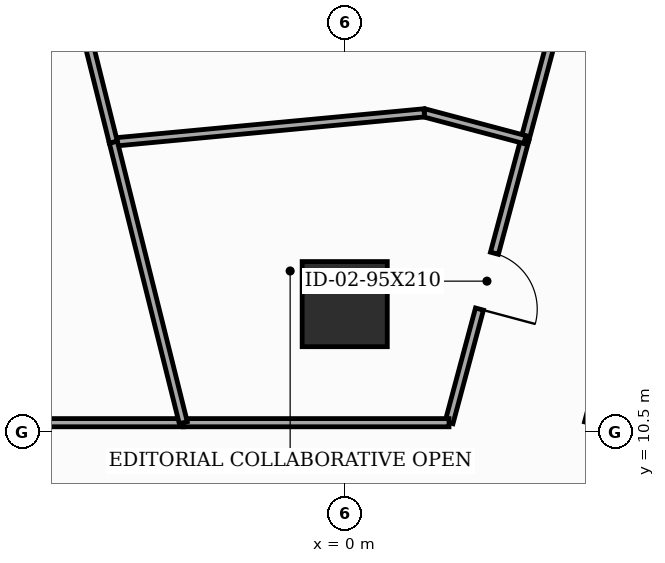
"""IFC4 building model, lengths in metres.
Left out: names, types, materials, properties, quantities, classifications, styles, units other than length and angle.
Written with IfcOpenShell. Run it as: python <this file> out.ifc"""

import sys

from ifc_helpers import new_model, si_unit, direction, frame, frame_2d, origin, origin_2d, place, context, subcontext, project, spatial, rectangle, extrude, element, fill, save


model = new_model("IFC4")
c1 = context("Model", 3, precision=1e-05, world=origin(), true_north=direction((0.0, 1.0)))
c2 = subcontext(c1, "Body", "Model", "MODEL_VIEW")
j1 = project(units=[si_unit("LENGTHUNIT", "METRE"), si_unit("PLANEANGLEUNIT", "RADIAN")], contexts=[c1])
p1 = place(None, origin())
s1 = spatial("IfcSite", under=j1, at=p1, CompositionType="ELEMENT")
p2 = place(p1, origin())
s2 = spatial("IfcBuilding", under=s1, at=p2, CompositionType="ELEMENT")
p3 = place(p2, frame((0.0, 0.0, 74.1)))
s3 = spatial("IfcBuildingStorey", under=s2, at=p3, CompositionType="ELEMENT", Elevation=74.1)
p4 = place(p3, frame((0.0, 12.6, 0.0), z_axis=(0.0, 0.0, 1.0), x_axis=(1.0, 0.0, 0.0)))
e1 = element("IfcColumn", 1, at=p4, inside=s3, PredefinedType="COLUMN", context=c2, shape_type="SweptSolid", body=[
    extrude(rectangle(XDim=1.4, YDim=1.4, at=origin_2d()), origin(), (0.0, 0.0, 1.0), 3.7),
])
p5 = place(p3, frame((2.963, 15.306, 0.0), z_axis=(0.0, 0.0, 1.0), x_axis=(-0.25886350996, -0.965913910869, 0.0)))
e2 = element("IfcWall", 2, at=p5, inside=s3, PredefinedType="PARTITIONING", context=c2, shape_type="SweptSolid", body=[
    extrude(rectangle(XDim=4.82, YDim=0.135, at=frame_2d((2.41, 0.0))), origin(), (0.0, 0.0, 1.0), 2.785),
])
p6 = place(p5, frame((1.935, 0.0, 0.0)))
e3 = element("IfcOpeningElement", 3, at=p6, cuts=e2, PredefinedType="OPENING", context=c2, shape_type="SweptSolid", body=[
    extrude(rectangle(XDim=0.95, YDim=2.1, at=frame_2d((0.475, 1.05))), frame((0.0, 0.077, 0.0), z_axis=(0.0, -1.0, 0.0), x_axis=(1.0, 0.0, 0.0)), (0.0, 0.0, 1.0), 0.155),
])
p7 = place(p3, frame((1.715, 10.65, 0.0), z_axis=(0.0, 0.0, 1.0), x_axis=(-1.0, 0.0, 0.0)))
e4 = element("IfcWall", 4, at=p7, inside=s3, PredefinedType="PARTITIONING", context=c2, shape_type="SweptSolid", body=[
    extrude(rectangle(XDim=4.37, YDim=0.135, at=frame_2d((2.185, 0.0))), origin(), (0.0, 0.0, 1.0), 2.785),
])
p8 = place(p3, frame((4.269, 20.183, 0.0), z_axis=(0.0, 0.0, 1.0), x_axis=(-0.258691774004, -0.965959919491, 0.0)))
e5 = element("IfcWall", 5, at=p8, inside=s3, PredefinedType="PARTITIONING", context=c2, shape_type="SweptSolid", body=[
    extrude(rectangle(XDim=5.049, YDim=0.135, at=frame_2d((2.524, 0.0))), origin(), (0.0, 0.0, 1.0), 3.085),
])
p9 = place(p8, frame((2.049, 0.0, 0.0)))
e6 = element("IfcOpeningElement", 6, at=p9, cuts=e5, PredefinedType="OPENING", context=c2, shape_type="SweptSolid", body=[
    extrude(rectangle(XDim=0.95, YDim=2.1, at=frame_2d((0.475, 1.05))), frame((0.0, 0.077, 0.0), z_axis=(0.0, -1.0, 0.0), x_axis=(1.0, 0.0, 0.0)), (0.0, 0.0, 1.0), 0.155),
])
p10 = place(p3, frame((3.992, 10.65, 0.0), z_axis=(0.0, 0.0, 1.0), x_axis=(0.258975157658, 0.965883982534, 0.0)))
e7 = element("IfcWall", 7, at=p10, inside=s3, PredefinedType="MOVABLE", context=c2, shape_type="SweptSolid", body=[
    extrude(rectangle(XDim=4.237, YDim=0.1, at=frame_2d((2.118, 0.0))), origin(), (0.0, 0.0, 1.0), 2.785),
])
p11 = place(p3, frame((-2.655, 10.65, 0.0), z_axis=(0.0, 0.0, 1.0), x_axis=(-1.0, 0.0, 0.0)))
e8 = element("IfcWall", 8, at=p11, inside=s3, PredefinedType="PARTITIONING", context=c2, shape_type="SweptSolid", body=[
    extrude(rectangle(XDim=7.495, YDim=0.135, at=frame_2d((3.748, 0.0))), origin(), (0.0, 0.0, 1.0), 2.785),
])
p12 = place(p3, frame((2.963, 15.306, 0.0), z_axis=(0.0, 0.0, 1.0), x_axis=(-0.966393308076, 0.257068034001, 0.0)))
e9 = element("IfcWall", 9, at=p12, inside=s3, PredefinedType="PARTITIONING", context=c2, shape_type="SweptSolid", body=[
    extrude(rectangle(XDim=1.712, YDim=0.135, at=frame_2d((0.856, 0.0))), origin(), (0.0, 0.0, 1.0), 2.785),
])
p13 = place(p3, frame((1.308, 15.746, 0.0), z_axis=(0.0, 0.0, 1.0), x_axis=(-0.995602282193, -0.09368081817, 0.0)))
e10 = element("IfcWall", 10, at=p13, inside=s3, PredefinedType="PARTITIONING", context=c2, shape_type="SweptSolid", body=[
    extrude(rectangle(XDim=5.137, YDim=0.135, at=frame_2d((2.568, 0.0))), origin(), (0.0, 0.0, 1.0), 2.785),
])
p14 = place(p3, frame((-3.806, 15.265, 0.0), z_axis=(0.0, 0.0, 1.0), x_axis=(0.241967938053, -0.970284245443, 0.0)))
e11 = element("IfcWall", 11, at=p14, inside=s3, PredefinedType="PARTITIONING", context=c2, shape_type="SweptSolid", body=[
    extrude(rectangle(XDim=4.756, YDim=0.135, at=frame_2d((2.378, 0.0))), origin(), (0.0, 0.0, 1.0), 2.785),
])
p15 = place(p3, frame((-7.718, 30.954, 0.0), z_axis=(0.0, 0.0, 1.0), x_axis=(0.241928072824, -0.9702941861, 0.0)))
e12 = element("IfcWall", 12, at=p15, inside=s3, PredefinedType="PARTITIONING", context=c2, shape_type="SweptSolid", body=[
    extrude(rectangle(XDim=16.169, YDim=0.135, at=frame_2d((8.085, 0.0))), origin(), (0.0, 0.0, 1.0), 2.935),
])
p16 = place(p6, origin())
e13 = element("IfcDoor", 13, at=p16, inside=s3, OperationType="SINGLE_SWING_RIGHT", PredefinedType="DOOR", context=c2, shape_type="SweptSolid", body=[
    extrude(rectangle(XDim=0.95, YDim=2.1, at=frame_2d((0.475, 1.05))), frame((0.0, 0.025, 0.0), z_axis=(0.0, -1.0, 0.0), x_axis=(1.0, 0.0, 0.0)), (0.0, 0.0, 1.0), 0.05),
])
fill(e3, e13)
save(model, sys.argv[1])
